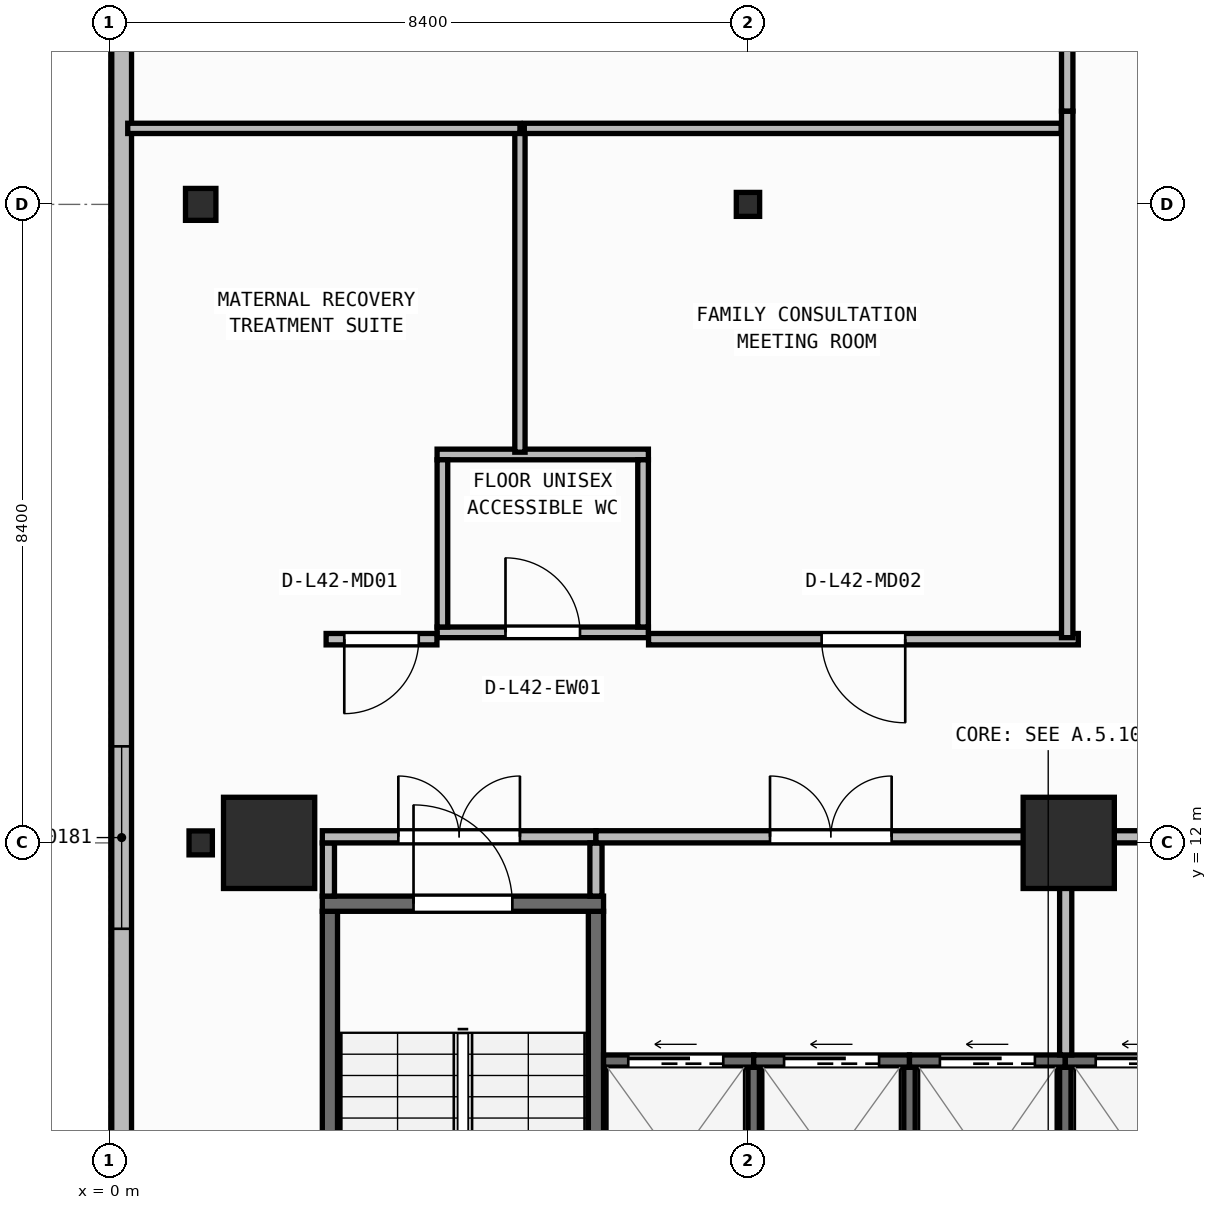
"""IFC4 building model, lengths in metres.
Left out: names, types, materials, properties, quantities, classifications, styles, units other than length and angle.
Written with IfcOpenShell. Run it as: python <this file> out.ifc"""

import sys

from ifc_helpers import new_model, si_unit, direction, frame, frame_2d, origin, origin_2d, place, context, subcontext, project, spatial, rectangle, i_section, extrude, element, fill, save


model = new_model("IFC4")
c1 = context("Model", 3, precision=1e-05, world=origin(), true_north=direction((0.0, 1.0)))
c2 = subcontext(c1, "Body", "Model", "MODEL_VIEW")
j1 = project(units=[si_unit("LENGTHUNIT", "METRE"), si_unit("PLANEANGLEUNIT", "RADIAN")], contexts=[c1])
p1 = place(None, origin())
s1 = spatial("IfcSite", under=j1, at=p1, CompositionType="ELEMENT")
p2 = place(p1, origin())
s2 = spatial("IfcBuilding", under=s1, at=p2, CompositionType="ELEMENT")
p3 = place(p2, frame((0.0, 0.0, 170.5)))
s3 = spatial("IfcBuildingStorey", under=s2, at=p3, CompositionType="ELEMENT", Elevation=170.5)
p4 = place(p3, frame((1.2, 12.0, 0.0), z_axis=(0.0, 0.0, 1.0), x_axis=(1.0, 0.0, 0.0)))
e1 = element("IfcColumn", 1, at=p4, inside=s3, PredefinedType="COLUMN", context=c2, shape_type="SweptSolid", body=[
    extrude(i_section(OverallWidth=0.307, OverallDepth=0.315, WebThickness=0.012, FlangeThickness=0.019, FilletRadius=0.017, at=origin_2d()), origin(), (0.0, 0.0, 1.0), 3.95),
])
for number, where, z_axis, x_axis in (
    (2, (2.1, 12.0, 0.0), (0.0, 0.0, 1.0), (1.0, 0.0, 0.0)),
    (3, (12.62, 12.0, 0.0), (0.0, 0.0, 1.0), (1.0, 0.0, 0.0)),
):
    element("IfcColumn", number, at=place(p3, frame(where, z_axis=z_axis, x_axis=x_axis)), inside=s3, PredefinedType="COLUMN", context=c2, shape_type="SweptSolid", body=[
        extrude(rectangle(XDim=1.2, YDim=1.2, at=origin_2d()), origin(), (0.0, 0.0, 1.0), 3.95),
    ])
p5 = place(p3, frame((1.2, 20.4, 0.0), z_axis=(0.0, 0.0, 1.0), x_axis=(1.0, 0.0, 0.0)))
e4 = element("IfcColumn", 4, at=p5, inside=s3, PredefinedType="COLUMN", context=c2, shape_type="SweptSolid", body=[
    extrude(i_section(OverallWidth=0.4, OverallDepth=0.42, WebThickness=0.025, FlangeThickness=0.04, at=origin_2d()), origin(), (0.0, 0.0, 1.0), 3.95),
])
p6 = place(p3, frame((8.4, 20.4, 0.0), z_axis=(0.0, 0.0, 1.0), x_axis=(1.0, 0.0, 0.0)))
e5 = element("IfcColumn", 5, at=p6, inside=s3, PredefinedType="COLUMN", context=c2, shape_type="SweptSolid", body=[
    extrude(i_section(OverallWidth=0.307, OverallDepth=0.315, WebThickness=0.012, FlangeThickness=0.019, FilletRadius=0.017, at=origin_2d()), origin(), (0.0, 0.0, 1.0), 3.95),
])
p7 = place(p3, frame((0.16, 40.64, 0.0), z_axis=(0.0, 0.0, 1.0), x_axis=(0.0, -1.0, 0.0)))
e6 = element("IfcWall", 6, at=p7, inside=s3, PredefinedType="STANDARD", context=c2, shape_type="SweptSolid", body=[
    extrude(rectangle(XDim=37.88, YDim=0.26, at=frame_2d((18.94, 0.0))), origin(), (0.0, 0.0, 1.0), 3.67),
])
p8 = place(p7, frame((27.37, 0.0, 0.9)))
e7 = element("IfcOpeningElement", 7, at=p8, cuts=e6, PredefinedType="OPENING", context=c2, shape_type="SweptSolid", body=[
    extrude(rectangle(XDim=2.4, YDim=1.65, at=frame_2d((1.2, 0.825))), frame((0.0, 0.14, 0.0), z_axis=(0.0, -1.0, 0.0), x_axis=(1.0, 0.0, 0.0)), (0.0, 0.0, 1.0), 0.28),
])
for number, where, z_axis, x_axis in (
    (8, (2.9, 3.5, 0.0), (0.0, 0.0, 1.0), (0.0, 1.0, 0.0)),
    (9, (6.4, 3.5, 0.0), (0.0, 0.0, 1.0), (0.0, 1.0, 0.0)),
):
    element("IfcWall", number, at=place(p3, frame(where, z_axis=z_axis, x_axis=x_axis)), inside=s3, PredefinedType="SHEAR", context=c2, shape_type="SweptSolid", body=[
        extrude(rectangle(XDim=7.6, YDim=0.2, at=frame_2d((3.8, 0.0))), origin(), (0.0, 0.0, 1.0), 3.67),
    ])
p9 = place(p3, frame((2.8, 11.2, 0.0), z_axis=(0.0, 0.0, 1.0), x_axis=(1.0, 0.0, 0.0)))
e10 = element("IfcWall", 10, at=p9, inside=s3, PredefinedType="SHEAR", context=c2, shape_type="SweptSolid", body=[
    extrude(rectangle(XDim=3.7, YDim=0.2, at=frame_2d((1.85, 0.0))), origin(), (0.0, 0.0, 1.0), 3.67),
])
p10 = place(p9, frame((1.2, 0.0, 0.0)))
e11 = element("IfcOpeningElement", 11, at=p10, cuts=e10, PredefinedType="OPENING", context=c2, shape_type="SweptSolid", body=[
    extrude(rectangle(XDim=1.3, YDim=2.15, at=frame_2d((0.65, 1.075))), frame((0.0, 0.11, 0.0), z_axis=(0.0, -1.0, 0.0), x_axis=(1.0, 0.0, 0.0)), (0.0, 0.0, 1.0), 0.22),
])
for number, where, z_axis, x_axis in (
    (12, (8.475, 6.3, 0.0), (0.0, 0.0, 1.0), (0.0, 1.0, 0.0)),
    (13, (10.525, 6.3, 0.0), (0.0, 0.0, 1.0), (0.0, 1.0, 0.0)),
    (14, (12.575, 6.3, 0.0), (0.0, 0.0, 1.0), (0.0, 1.0, 0.0)),
):
    element("IfcWall", number, at=place(p3, frame(where, z_axis=z_axis, x_axis=x_axis)), inside=s3, PredefinedType="SHEAR", context=c2, shape_type="SweptSolid", body=[
        extrude(rectangle(XDim=2.75, YDim=0.15, at=frame_2d((1.375, 0.0))), origin(), (0.0, 0.0, 1.0), 3.67),
    ])
p11 = place(p3, frame((6.5, 9.13, 0.0), z_axis=(0.0, 0.0, 1.0), x_axis=(1.0, 0.0, 0.0)))
e15 = element("IfcWall", 15, at=p11, inside=s3, PredefinedType="SHEAR", context=c2, shape_type="SweptSolid", body=[
    extrude(rectangle(XDim=1.975, YDim=0.16, at=frame_2d((0.988, 0.0))), origin(), (0.0, 0.0, 1.0), 3.67),
])
p12 = place(p11, frame((0.325, 0.0, 0.0)))
e16 = element("IfcOpeningElement", 16, at=p12, cuts=e15, PredefinedType="OPENING", context=c2, shape_type="SweptSolid", body=[
    extrude(rectangle(XDim=1.25, YDim=2.15, at=frame_2d((0.625, 1.075))), frame((0.0, 0.09, 0.0), z_axis=(0.0, -1.0, 0.0), x_axis=(1.0, 0.0, 0.0)), (0.0, 0.0, 1.0), 0.18),
])
p13 = place(p3, frame((8.475, 9.13, 0.0), z_axis=(0.0, 0.0, 1.0), x_axis=(1.0, 0.0, 0.0)))
e17 = element("IfcWall", 17, at=p13, inside=s3, PredefinedType="SHEAR", context=c2, shape_type="SweptSolid", body=[
    extrude(rectangle(XDim=2.05, YDim=0.16, at=frame_2d((1.025, 0.0))), origin(), (0.0, 0.0, 1.0), 3.67),
])
p14 = place(p13, frame((0.4, 0.0, 0.0)))
e18 = element("IfcOpeningElement", 18, at=p14, cuts=e17, PredefinedType="OPENING", context=c2, shape_type="SweptSolid", body=[
    extrude(rectangle(XDim=1.25, YDim=2.15, at=frame_2d((0.625, 1.075))), frame((0.0, 0.09, 0.0), z_axis=(0.0, -1.0, 0.0), x_axis=(1.0, 0.0, 0.0)), (0.0, 0.0, 1.0), 0.18),
])
p15 = place(p3, frame((10.525, 9.13, 0.0), z_axis=(0.0, 0.0, 1.0), x_axis=(1.0, 0.0, 0.0)))
e19 = element("IfcWall", 19, at=p15, inside=s3, PredefinedType="SHEAR", context=c2, shape_type="SweptSolid", body=[
    extrude(rectangle(XDim=2.05, YDim=0.16, at=frame_2d((1.025, 0.0))), origin(), (0.0, 0.0, 1.0), 3.67),
])
p16 = place(p15, frame((0.4, 0.0, 0.0)))
e20 = element("IfcOpeningElement", 20, at=p16, cuts=e19, PredefinedType="OPENING", context=c2, shape_type="SweptSolid", body=[
    extrude(rectangle(XDim=1.25, YDim=2.15, at=frame_2d((0.625, 1.075))), frame((0.0, 0.09, 0.0), z_axis=(0.0, -1.0, 0.0), x_axis=(1.0, 0.0, 0.0)), (0.0, 0.0, 1.0), 0.18),
])
p17 = place(p3, frame((12.575, 9.13, 0.0), z_axis=(0.0, 0.0, 1.0), x_axis=(1.0, 0.0, 0.0)))
e21 = element("IfcWall", 21, at=p17, inside=s3, PredefinedType="SHEAR", context=c2, shape_type="SweptSolid", body=[
    extrude(rectangle(XDim=2.05, YDim=0.16, at=frame_2d((1.025, 0.0))), origin(), (0.0, 0.0, 1.0), 3.67),
])
p18 = place(p17, frame((0.4, 0.0, 0.0)))
e22 = element("IfcOpeningElement", 22, at=p18, cuts=e21, PredefinedType="OPENING", context=c2, shape_type="SweptSolid", body=[
    extrude(rectangle(XDim=1.25, YDim=2.15, at=frame_2d((0.625, 1.075))), frame((0.0, 0.09, 0.0), z_axis=(0.0, -1.0, 0.0), x_axis=(1.0, 0.0, 0.0)), (0.0, 0.0, 1.0), 0.18),
])
p19 = place(p3, frame((2.88, 11.3, 0.0), z_axis=(0.0, 0.0, 1.0), x_axis=(0.0, 1.0, 0.0)))
e23 = element("IfcWall", 23, at=p19, inside=s3, PredefinedType="PARTITIONING", context=c2, shape_type="SweptSolid", body=[
    extrude(rectangle(XDim=0.7, YDim=0.16, at=frame_2d((0.35, 0.0))), origin(), (0.0, 0.0, 1.0), 3.67),
])
p20 = place(p3, frame((2.8, 12.08, 0.0), z_axis=(0.0, 0.0, 1.0), x_axis=(1.0, 0.0, 0.0)))
e24 = element("IfcWall", 24, at=p20, inside=s3, PredefinedType="PARTITIONING", context=c2, shape_type="SweptSolid", body=[
    extrude(rectangle(XDim=3.6, YDim=0.16, at=frame_2d((1.8, 0.0))), origin(), (0.0, 0.0, 1.0), 3.043),
])
p21 = place(p20, frame((1.0, 0.0, 0.0)))
e25 = element("IfcOpeningElement", 25, at=p21, cuts=e24, PredefinedType="OPENING", context=c2, shape_type="SweptSolid", body=[
    extrude(rectangle(XDim=1.6, YDim=2.05, at=frame_2d((0.8, 1.025))), frame((0.0, 0.09, 0.0), z_axis=(0.0, -1.0, 0.0), x_axis=(1.0, 0.0, 0.0)), (0.0, 0.0, 1.0), 0.18),
])
p22 = place(p3, frame((6.4, 11.3, 0.0), z_axis=(0.0, 0.0, 1.0), x_axis=(0.0, 1.0, 0.0)))
e26 = element("IfcWall", 26, at=p22, inside=s3, PredefinedType="PARTITIONING", context=c2, shape_type="SweptSolid", body=[
    extrude(rectangle(XDim=0.7, YDim=0.16, at=frame_2d((0.35, 0.0))), origin(), (0.0, 0.0, 1.0), 3.67),
])
p23 = place(p3, frame((6.4, 12.08, 0.0), z_axis=(0.0, 0.0, 1.0), x_axis=(1.0, 0.0, 0.0)))
e27 = element("IfcWall", 27, at=p23, inside=s3, PredefinedType="PARTITIONING", context=c2, shape_type="SweptSolid", body=[
    extrude(rectangle(XDim=6.18, YDim=0.16, at=frame_2d((3.09, 0.0))), origin(), (0.0, 0.0, 1.0), 3.043),
])
p24 = place(p23, frame((2.29, 0.0, 0.0)))
e28 = element("IfcOpeningElement", 28, at=p24, cuts=e27, PredefinedType="OPENING", context=c2, shape_type="SweptSolid", body=[
    extrude(rectangle(XDim=1.6, YDim=2.05, at=frame_2d((0.8, 1.025))), frame((0.0, 0.09, 0.0), z_axis=(0.0, -1.0, 0.0), x_axis=(1.0, 0.0, 0.0)), (0.0, 0.0, 1.0), 0.18),
])
p25 = place(p3, frame((12.58, 9.21, 0.0), z_axis=(0.0, 0.0, 1.0), x_axis=(0.0, 1.0, 0.0)))
e29 = element("IfcWall", 29, at=p25, inside=s3, PredefinedType="PARTITIONING", context=c2, shape_type="SweptSolid", body=[
    extrude(rectangle(XDim=2.79, YDim=0.16, at=frame_2d((1.395, 0.0))), origin(), (0.0, 0.0, 1.0), 3.67),
])
p26 = place(p3, frame((12.58, 12.08, 0.0), z_axis=(0.0, 0.0, 1.0), x_axis=(1.0, 0.0, 0.0)))
e30 = element("IfcWall", 30, at=p26, inside=s3, PredefinedType="PARTITIONING", context=c2, shape_type="SweptSolid", body=[
    extrude(rectangle(XDim=7.7, YDim=0.16, at=frame_2d((3.85, 0.0))), origin(), (0.0, 0.0, 1.0), 3.043),
])
p27 = place(p26, frame((3.05, 0.0, 0.0)))
e31 = element("IfcOpeningElement", 31, at=p27, cuts=e30, PredefinedType="OPENING", context=c2, shape_type="SweptSolid", body=[
    extrude(rectangle(XDim=1.6, YDim=2.05, at=frame_2d((0.8, 1.025))), frame((0.0, 0.09, 0.0), z_axis=(0.0, -1.0, 0.0), x_axis=(1.0, 0.0, 0.0)), (0.0, 0.0, 1.0), 0.18),
])
p28 = place(p3, frame((4.31, 14.77, 0.0), z_axis=(0.0, 0.0, 1.0), x_axis=(1.0, 0.0, 0.0)))
e32 = element("IfcWall", 32, at=p28, inside=s3, PredefinedType="PARTITIONING", context=c2, shape_type="SweptSolid", body=[
    extrude(rectangle(XDim=2.78, YDim=0.14, at=frame_2d((1.39, 0.0))), origin(), (0.0, 0.0, 1.0), 3.67),
])
p29 = place(p28, frame((0.9, 0.0, 0.0)))
e33 = element("IfcOpeningElement", 33, at=p29, cuts=e32, PredefinedType="OPENING", context=c2, shape_type="SweptSolid", body=[
    extrude(rectangle(XDim=0.98, YDim=2.1, at=frame_2d((0.49, 1.05))), frame((0.0, 0.08, 0.0), z_axis=(0.0, -1.0, 0.0), x_axis=(1.0, 0.0, 0.0)), (0.0, 0.0, 1.0), 0.16),
])
p30 = place(p3, frame((4.31, 17.11, 0.0), z_axis=(0.0, 0.0, 1.0), x_axis=(1.0, 0.0, 0.0)))
e34 = element("IfcWall", 34, at=p30, inside=s3, PredefinedType="PARTITIONING", context=c2, shape_type="SweptSolid", body=[
    extrude(rectangle(XDim=2.78, YDim=0.14, at=frame_2d((1.39, 0.0))), origin(), (0.0, 0.0, 1.0), 3.67),
])
for number, where, z_axis, x_axis in (
    (35, (4.38, 14.84, 0.0), (0.0, 0.0, 1.0), (0.0, 1.0, 0.0)),
    (36, (7.02, 14.84, 0.0), (0.0, 0.0, 1.0), (0.0, 1.0, 0.0)),
):
    element("IfcWall", number, at=place(p3, frame(where, z_axis=z_axis, x_axis=x_axis)), inside=s3, PredefinedType="PARTITIONING", context=c2, shape_type="SweptSolid", body=[
        extrude(rectangle(XDim=2.2, YDim=0.14, at=frame_2d((1.1, 0.0))), origin(), (0.0, 0.0, 1.0), 3.67),
    ])
p31 = place(p3, frame((4.308, 14.68, 0.0), z_axis=(0.0, 0.0, 1.0), x_axis=(-1.0, 0.0, 0.0)))
e37 = element("IfcWall", 37, at=p31, inside=s3, PredefinedType="PARTITIONING", context=c2, shape_type="SweptSolid", body=[
    extrude(rectangle(XDim=1.458, YDim=0.15, at=frame_2d((0.729, 0.0))), origin(), (0.0, 0.0, 1.0), 3.67),
])
p32 = place(p31, frame((0.239, 0.0, 0.0)))
e38 = element("IfcOpeningElement", 38, at=p32, cuts=e37, PredefinedType="OPENING", context=c2, shape_type="SweptSolid", body=[
    extrude(rectangle(XDim=0.98, YDim=2.1, at=frame_2d((0.49, 1.05))), frame((0.0, 0.085, 0.0), z_axis=(0.0, -1.0, 0.0), x_axis=(1.0, 0.0, 0.0)), (0.0, 0.0, 1.0), 0.17),
])
p33 = place(p3, frame((12.746, 14.68, 0.0), z_axis=(0.0, 0.0, 1.0), x_axis=(-1.0, 0.0, 0.0)))
e39 = element("IfcWall", 39, at=p33, inside=s3, PredefinedType="PARTITIONING", context=c2, shape_type="SweptSolid", body=[
    extrude(rectangle(XDim=5.654, YDim=0.15, at=frame_2d((2.827, 0.0))), origin(), (0.0, 0.0, 1.0), 3.67),
])
p34 = place(p33, frame((2.277, 0.0, 0.0)))
e40 = element("IfcOpeningElement", 40, at=p34, cuts=e39, PredefinedType="OPENING", context=c2, shape_type="SweptSolid", body=[
    extrude(rectangle(XDim=1.1, YDim=2.1, at=frame_2d((0.55, 1.05))), frame((0.0, 0.085, 0.0), z_axis=(0.0, -1.0, 0.0), x_axis=(1.0, 0.0, 0.0)), (0.0, 0.0, 1.0), 0.17),
])
p35 = place(p3, frame((12.6, 21.626, 0.0), z_axis=(0.0, 0.0, 1.0), x_axis=(0.0, -1.0, 0.0)))
e41 = element("IfcWall", 41, at=p35, inside=s3, PredefinedType="PARTITIONING", context=c2, shape_type="SweptSolid", body=[
    extrude(rectangle(XDim=6.926, YDim=0.15, at=frame_2d((3.463, 0.0))), origin(), (0.0, 0.0, 1.0), 3.67),
])
p36 = place(p3, frame((12.6, 27.26, 0.0), z_axis=(0.0, 0.0, 1.0), x_axis=(0.0, -1.0, 0.0)))
e42 = element("IfcWall", 42, at=p36, inside=s3, PredefinedType="PARTITIONING", context=c2, shape_type="SweptSolid", body=[
    extrude(rectangle(XDim=5.632, YDim=0.15, at=frame_2d((2.816, 0.0))), origin(), (0.0, 0.0, 1.0), 3.67),
])
p37 = place(p36, frame((2.266, 0.0, 0.0)))
e43 = element("IfcOpeningElement", 43, at=p37, cuts=e42, PredefinedType="OPENING", context=c2, shape_type="SweptSolid", body=[
    extrude(rectangle(XDim=1.1, YDim=2.1, at=frame_2d((0.55, 1.05))), frame((0.0, 0.085, 0.0), z_axis=(0.0, -1.0, 0.0), x_axis=(1.0, 0.0, 0.0)), (0.0, 0.0, 1.0), 0.17),
])
p38 = place(p3, frame((5.4, 17.14, 0.0), z_axis=(0.0, 0.0, 1.0), x_axis=(0.0, 1.0, 0.0)))
e44 = element("IfcWall", 44, at=p38, inside=s3, PredefinedType="PARTITIONING", context=c2, shape_type="SweptSolid", body=[
    extrude(rectangle(XDim=4.26, YDim=0.135, at=frame_2d((2.13, 0.0))), origin(), (0.0, 0.0, 1.0), 3.67),
])
p39 = place(p3, frame((5.4, 21.4, 0.0), z_axis=(0.0, 0.0, 1.0), x_axis=(-1.0, 0.0, 0.0)))
e45 = element("IfcWall", 45, at=p39, inside=s3, PredefinedType="PARTITIONING", context=c2, shape_type="SweptSolid", body=[
    extrude(rectangle(XDim=5.16, YDim=0.135, at=frame_2d((2.58, 0.0))), origin(), (0.0, 0.0, 1.0), 3.67),
])
p40 = place(p3, frame((12.52, 21.4, 0.0), z_axis=(0.0, 0.0, 1.0), x_axis=(-1.0, 0.0, 0.0)))
e46 = element("IfcWall", 46, at=p40, inside=s3, PredefinedType="PARTITIONING", context=c2, shape_type="SweptSolid", body=[
    extrude(rectangle(XDim=7.062, YDim=0.135, at=frame_2d((3.531, 0.0))), origin(), (0.0, 0.0, 1.0), 3.67),
])
p41 = place(p8, origin())
e47 = element("IfcWindow", 47, at=p41, inside=s3, PartitioningType="SINGLE_PANEL", PredefinedType="WINDOW", context=c2, shape_type="SweptSolid", body=[
    extrude(rectangle(XDim=2.4, YDim=1.65, at=frame_2d((1.2, 0.825))), frame((0.0, 0.03, 0.0), z_axis=(0.0, -1.0, 0.0), x_axis=(1.0, 0.0, 0.0)), (0.0, 0.0, 1.0), 0.06),
])
fill(e7, e47)
p42 = place(p10, origin())
e48 = element("IfcDoor", 48, at=p42, inside=s3, OperationType="SINGLE_SWING_LEFT", PredefinedType="DOOR", context=c2, shape_type="SweptSolid", body=[
    extrude(rectangle(XDim=1.3, YDim=2.15, at=frame_2d((0.65, 1.075))), frame((0.0, 0.025, 0.0), z_axis=(0.0, -1.0, 0.0), x_axis=(1.0, 0.0, 0.0)), (0.0, 0.0, 1.0), 0.05),
])
fill(e11, e48)
p43 = place(p12, origin())
e49 = element("IfcDoor", 49, at=p43, inside=s3, OperationType="SLIDING_TO_LEFT", PredefinedType="DOOR", context=c2, shape_type="SweptSolid", body=[
    extrude(rectangle(XDim=1.25, YDim=2.15, at=frame_2d((0.625, 1.075))), frame((0.0, 0.025, 0.0), z_axis=(0.0, -1.0, 0.0), x_axis=(1.0, 0.0, 0.0)), (0.0, 0.0, 1.0), 0.05),
])
fill(e16, e49)
p44 = place(p14, origin())
e50 = element("IfcDoor", 50, at=p44, inside=s3, OperationType="SLIDING_TO_LEFT", PredefinedType="DOOR", context=c2, shape_type="SweptSolid", body=[
    extrude(rectangle(XDim=1.25, YDim=2.15, at=frame_2d((0.625, 1.075))), frame((0.0, 0.025, 0.0), z_axis=(0.0, -1.0, 0.0), x_axis=(1.0, 0.0, 0.0)), (0.0, 0.0, 1.0), 0.05),
])
fill(e18, e50)
p45 = place(p16, origin())
e51 = element("IfcDoor", 51, at=p45, inside=s3, OperationType="SLIDING_TO_LEFT", PredefinedType="DOOR", context=c2, shape_type="SweptSolid", body=[
    extrude(rectangle(XDim=1.25, YDim=2.15, at=frame_2d((0.625, 1.075))), frame((0.0, 0.025, 0.0), z_axis=(0.0, -1.0, 0.0), x_axis=(1.0, 0.0, 0.0)), (0.0, 0.0, 1.0), 0.05),
])
fill(e20, e51)
p46 = place(p18, origin())
e52 = element("IfcDoor", 52, at=p46, inside=s3, OperationType="SLIDING_TO_LEFT", PredefinedType="DOOR", context=c2, shape_type="SweptSolid", body=[
    extrude(rectangle(XDim=1.25, YDim=2.15, at=frame_2d((0.625, 1.075))), frame((0.0, 0.025, 0.0), z_axis=(0.0, -1.0, 0.0), x_axis=(1.0, 0.0, 0.0)), (0.0, 0.0, 1.0), 0.05),
])
fill(e22, e52)
p47 = place(p21, origin())
e53 = element("IfcDoor", 53, at=p47, inside=s3, OperationType="DOUBLE_DOOR_SINGLE_SWING", PredefinedType="DOOR", context=c2, shape_type="SweptSolid", body=[
    extrude(rectangle(XDim=1.6, YDim=2.05, at=frame_2d((0.8, 1.025))), frame((0.0, 0.025, 0.0), z_axis=(0.0, -1.0, 0.0), x_axis=(1.0, 0.0, 0.0)), (0.0, 0.0, 1.0), 0.05),
])
fill(e25, e53)
p48 = place(p24, origin())
e54 = element("IfcDoor", 54, at=p48, inside=s3, OperationType="DOUBLE_DOOR_SINGLE_SWING", PredefinedType="DOOR", context=c2, shape_type="SweptSolid", body=[
    extrude(rectangle(XDim=1.6, YDim=2.05, at=frame_2d((0.8, 1.025))), frame((0.0, 0.025, 0.0), z_axis=(0.0, -1.0, 0.0), x_axis=(1.0, 0.0, 0.0)), (0.0, 0.0, 1.0), 0.05),
])
fill(e28, e54)
p49 = place(p29, origin())
e55 = element("IfcDoor", 55, at=p49, inside=s3, OperationType="SINGLE_SWING_LEFT", PredefinedType="DOOR", context=c2, shape_type="SweptSolid", body=[
    extrude(rectangle(XDim=0.98, YDim=2.1, at=frame_2d((0.49, 1.05))), frame((0.0, 0.025, 0.0), z_axis=(0.0, -1.0, 0.0), x_axis=(1.0, 0.0, 0.0)), (0.0, 0.0, 1.0), 0.05),
])
fill(e33, e55)
p50 = place(p32, origin())
e56 = element("IfcDoor", 56, at=p50, inside=s3, OperationType="SINGLE_SWING_RIGHT", PredefinedType="DOOR", context=c2, shape_type="SweptSolid", body=[
    extrude(rectangle(XDim=0.98, YDim=2.1, at=frame_2d((0.49, 1.05))), frame((0.0, 0.025, 0.0), z_axis=(0.0, -1.0, 0.0), x_axis=(1.0, 0.0, 0.0)), (0.0, 0.0, 1.0), 0.05),
])
fill(e38, e56)
p51 = place(p34, origin())
e57 = element("IfcDoor", 57, at=p51, inside=s3, OperationType="SINGLE_SWING_LEFT", PredefinedType="DOOR", context=c2, shape_type="SweptSolid", body=[
    extrude(rectangle(XDim=1.1, YDim=2.1, at=frame_2d((0.55, 1.05))), frame((0.0, 0.025, 0.0), z_axis=(0.0, -1.0, 0.0), x_axis=(1.0, 0.0, 0.0)), (0.0, 0.0, 1.0), 0.05),
])
fill(e40, e57)
save(model, sys.argv[1])
